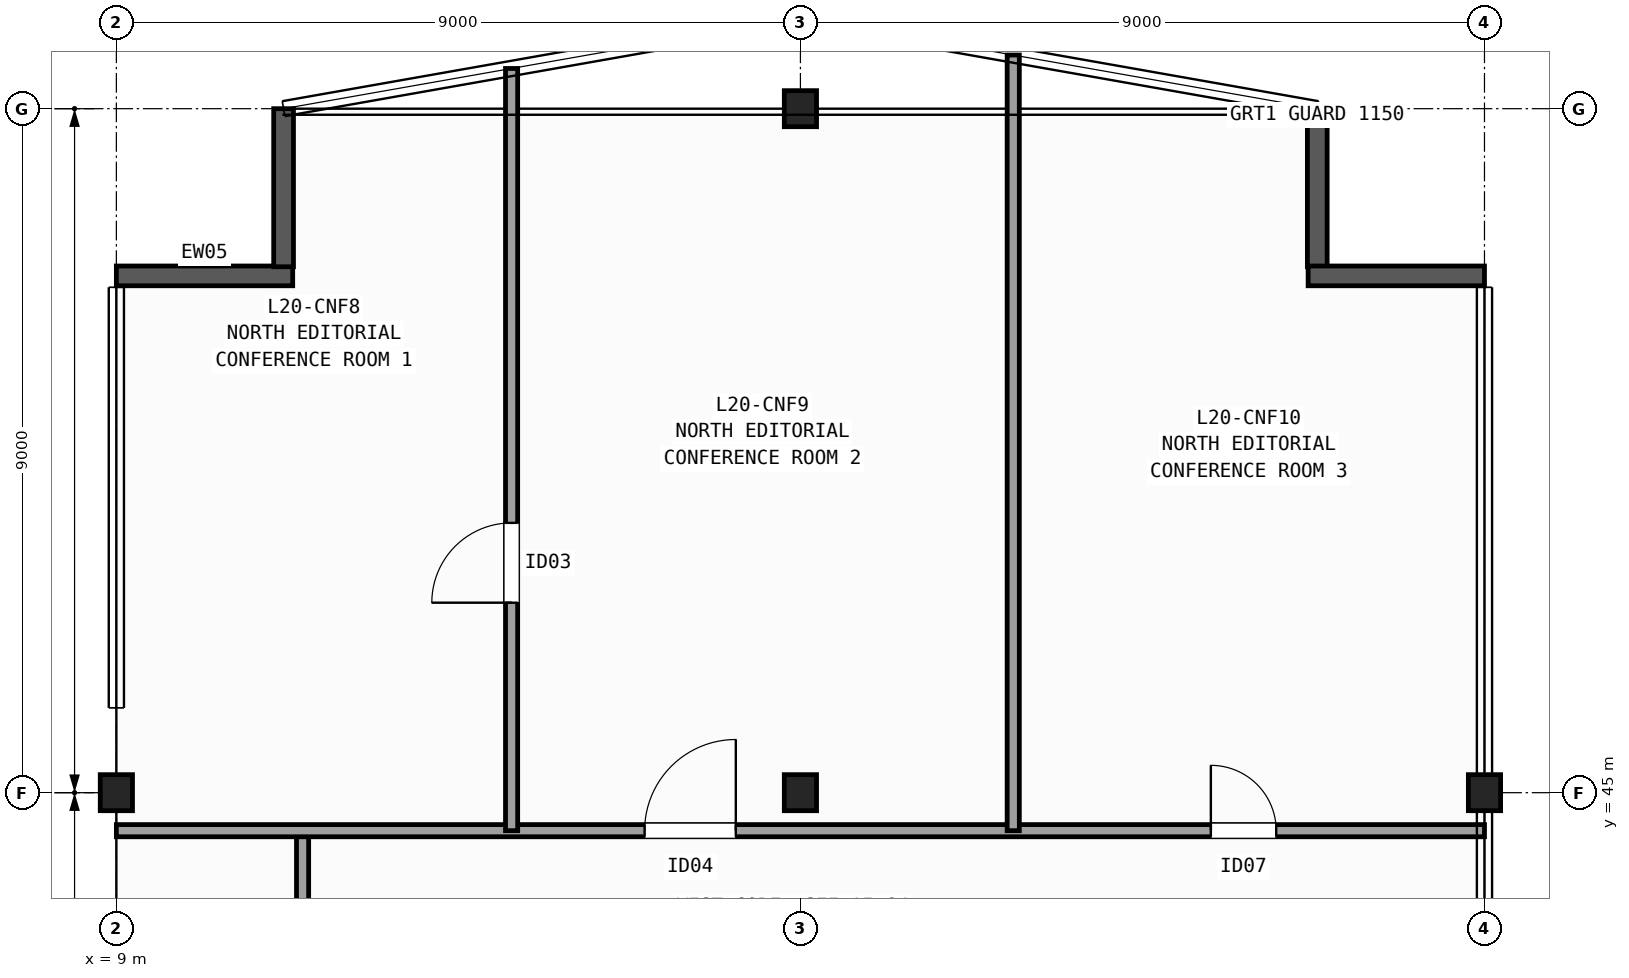
"""IFC4 building model, lengths in metres.
Left out: names, types, materials, properties, quantities, classifications, styles, units other than length and angle.
Written with IfcOpenShell. Run it as: python <this file> out.ifc"""

import sys

from ifc_helpers import new_model, si_unit, direction, frame, frame_2d, origin, origin_2d, place, context, subcontext, project, spatial, rectangle, i_section, extrude, element, fill, save


model = new_model("IFC4")
c1 = context("Model", 3, precision=1e-05, world=origin(), true_north=direction((0.0, 1.0)))
c2 = subcontext(c1, "Body", "Model", "MODEL_VIEW")
j1 = project(units=[si_unit("LENGTHUNIT", "METRE"), si_unit("PLANEANGLEUNIT", "RADIAN")], contexts=[c1])
p1 = place(None, origin())
s1 = spatial("IfcSite", under=j1, at=p1, CompositionType="ELEMENT")
p2 = place(p1, origin())
s2 = spatial("IfcBuilding", under=s1, at=p2, CompositionType="ELEMENT")
p3 = place(p2, frame((0.0, 0.0, 84.1)))
s3 = spatial("IfcBuildingStorey", under=s2, at=p3, CompositionType="ELEMENT", Elevation=84.1)
for number, where, z_axis, x_axis in (
    (1, (9.0, 45.0, 0.0), (0.0, 0.0, 1.0), (1.0, 0.0, 0.0)),
    (2, (18.0, 45.0, 0.0), (0.0, 0.0, 1.0), (1.0, 0.0, 0.0)),
    (3, (18.0, 54.0, 0.0), (0.0, 0.0, 1.0), (1.0, 0.0, 0.0)),
    (4, (27.0, 45.0, 0.0), (0.0, 0.0, 1.0), (1.0, 0.0, 0.0)),
):
    element("IfcColumn", number, at=place(p3, frame(where, z_axis=z_axis, x_axis=x_axis)), inside=s3, PredefinedType="COLUMN", context=c2, shape_type="SweptSolid", body=[
        extrude(i_section(OverallWidth=0.424, OverallDepth=0.474, WebThickness=0.048, FlangeThickness=0.077, FilletRadius=0.015, at=origin_2d()), origin(), (0.0, 0.0, 1.0), 5.0),
    ])
p4 = place(p3, frame((9.0, 51.8, 0.0), z_axis=(0.0, 0.0, 1.0), x_axis=(1.0, 0.0, 0.0)))
e5 = element("IfcWall", 5, at=p4, inside=s3, PredefinedType="SOLIDWALL", context=c2, shape_type="SweptSolid", body=[
    extrude(rectangle(XDim=2.32, YDim=0.26, at=frame_2d((1.16, 0.0))), origin(), (0.0, 0.0, 1.0), 4.72),
])
for number, where, z_axis, x_axis in (
    (6, (11.2, 51.92, 0.0), (0.0, 0.0, 1.0), (0.0, 1.0, 0.0)),
    (7, (24.8, 54.0, 0.0), (0.0, 0.0, 1.0), (0.0, -1.0, 0.0)),
):
    element("IfcWall", number, at=place(p3, frame(where, z_axis=z_axis, x_axis=x_axis)), inside=s3, PredefinedType="SOLIDWALL", context=c2, shape_type="SweptSolid", body=[
        extrude(rectangle(XDim=2.08, YDim=0.26, at=frame_2d((1.04, 0.0))), origin(), (0.0, 0.0, 1.0), 4.72),
    ])
p5 = place(p3, frame((24.68, 51.8, 0.0), z_axis=(0.0, 0.0, 1.0), x_axis=(1.0, 0.0, 0.0)))
e8 = element("IfcWall", 8, at=p5, inside=s3, PredefinedType="SOLIDWALL", context=c2, shape_type="SweptSolid", body=[
    extrude(rectangle(XDim=2.32, YDim=0.26, at=frame_2d((1.16, 0.0))), origin(), (0.0, 0.0, 1.0), 4.72),
])
p6 = place(p3, frame((11.45, 42.4, 0.0), z_axis=(0.0, 0.0, 1.0), x_axis=(0.0, 1.0, 0.0)))
e9 = element("IfcWall", 9, at=p6, inside=s3, PredefinedType="PARTITIONING", context=c2, shape_type="SweptSolid", body=[
    extrude(rectangle(XDim=2.1, YDim=0.16, at=frame_2d((1.05, 0.0))), origin(), (0.0, 0.0, 1.0), 4.72),
])
p7 = place(p3, frame((9.0, 44.5, 0.0), z_axis=(0.0, 0.0, 1.0), x_axis=(1.0, 0.0, 0.0)))
e10 = element("IfcWall", 10, at=p7, inside=s3, PredefinedType="PARTITIONING", context=c2, shape_type="SweptSolid", body=[
    extrude(rectangle(XDim=18.0, YDim=0.16, at=frame_2d((9.0, 0.0))), origin(), (0.0, 0.0, 1.0), 3.927),
])
p8 = place(p7, frame((6.95, 0.0, 0.0)))
e11 = element("IfcOpeningElement", 11, at=p8, cuts=e10, PredefinedType="OPENING", context=c2, shape_type="SweptSolid", body=[
    extrude(rectangle(XDim=1.2, YDim=2.15, at=frame_2d((0.6, 1.075))), frame((0.0, 0.09, 0.0), z_axis=(0.0, -1.0, 0.0), x_axis=(1.0, 0.0, 0.0)), (0.0, 0.0, 1.0), 0.18),
])
p9 = place(p7, frame((14.4, 0.0, 0.0)))
e12 = element("IfcOpeningElement", 12, at=p9, cuts=e10, PredefinedType="OPENING", context=c2, shape_type="SweptSolid", body=[
    extrude(rectangle(XDim=0.86, YDim=2.05, at=frame_2d((0.43, 1.025))), frame((0.0, 0.09, 0.0), z_axis=(0.0, -1.0, 0.0), x_axis=(1.0, 0.0, 0.0)), (0.0, 0.0, 1.0), 0.18),
])
p10 = place(p3, frame((14.2, 44.5, 0.0), z_axis=(0.0, 0.0, 1.0), x_axis=(0.0, 1.0, 0.0)))
e13 = element("IfcWall", 13, at=p10, inside=s3, PredefinedType="PARTITIONING", context=c2, shape_type="SweptSolid", body=[
    extrude(rectangle(XDim=10.029, YDim=0.16, at=frame_2d((5.015, 0.0))), origin(), (0.0, 0.0, 1.0), 4.089),
])
p11 = place(p10, frame((3.0, 0.0, 0.0)))
e14 = element("IfcOpeningElement", 14, at=p11, cuts=e13, PredefinedType="OPENING", context=c2, shape_type="SweptSolid", body=[
    extrude(rectangle(XDim=1.05, YDim=2.15, at=frame_2d((0.525, 1.075))), frame((0.0, 0.09, 0.0), z_axis=(0.0, -1.0, 0.0), x_axis=(1.0, 0.0, 0.0)), (0.0, 0.0, 1.0), 0.18),
])
p12 = place(p3, frame((20.8, 44.5, 0.0), z_axis=(0.0, 0.0, 1.0), x_axis=(0.0, 1.0, 0.0)))
e15 = element("IfcWall", 15, at=p12, inside=s3, PredefinedType="PARTITIONING", context=c2, shape_type="SweptSolid", body=[
    extrude(rectangle(XDim=10.206, YDim=0.16, at=frame_2d((5.103, 0.0))), origin(), (0.0, 0.0, 1.0), 4.089),
])
p13 = place(p11, origin())
e16 = element("IfcDoor", 16, at=p13, inside=s3, OperationType="SINGLE_SWING_LEFT", PredefinedType="DOOR", context=c2, shape_type="SweptSolid", body=[
    extrude(rectangle(XDim=1.05, YDim=2.15, at=frame_2d((0.525, 1.075))), frame((0.0, 0.025, 0.0), z_axis=(0.0, -1.0, 0.0), x_axis=(1.0, 0.0, 0.0)), (0.0, 0.0, 1.0), 0.05),
])
fill(e14, e16)
p14 = place(p8, origin())
e17 = element("IfcDoor", 17, at=p14, inside=s3, OperationType="SINGLE_SWING_RIGHT", PredefinedType="DOOR", context=c2, shape_type="SweptSolid", body=[
    extrude(rectangle(XDim=1.2, YDim=2.15, at=frame_2d((0.6, 1.075))), frame((0.0, 0.025, 0.0), z_axis=(0.0, -1.0, 0.0), x_axis=(1.0, 0.0, 0.0)), (0.0, 0.0, 1.0), 0.05),
])
fill(e11, e17)
p15 = place(p9, origin())
e18 = element("IfcDoor", 18, at=p15, inside=s3, OperationType="SINGLE_SWING_LEFT", PredefinedType="DOOR", context=c2, shape_type="SweptSolid", body=[
    extrude(rectangle(XDim=0.86, YDim=2.05, at=frame_2d((0.43, 1.025))), frame((0.0, 0.025, 0.0), z_axis=(0.0, -1.0, 0.0), x_axis=(1.0, 0.0, 0.0)), (0.0, 0.0, 1.0), 0.05),
])
fill(e12, e18)
save(model, sys.argv[1])
